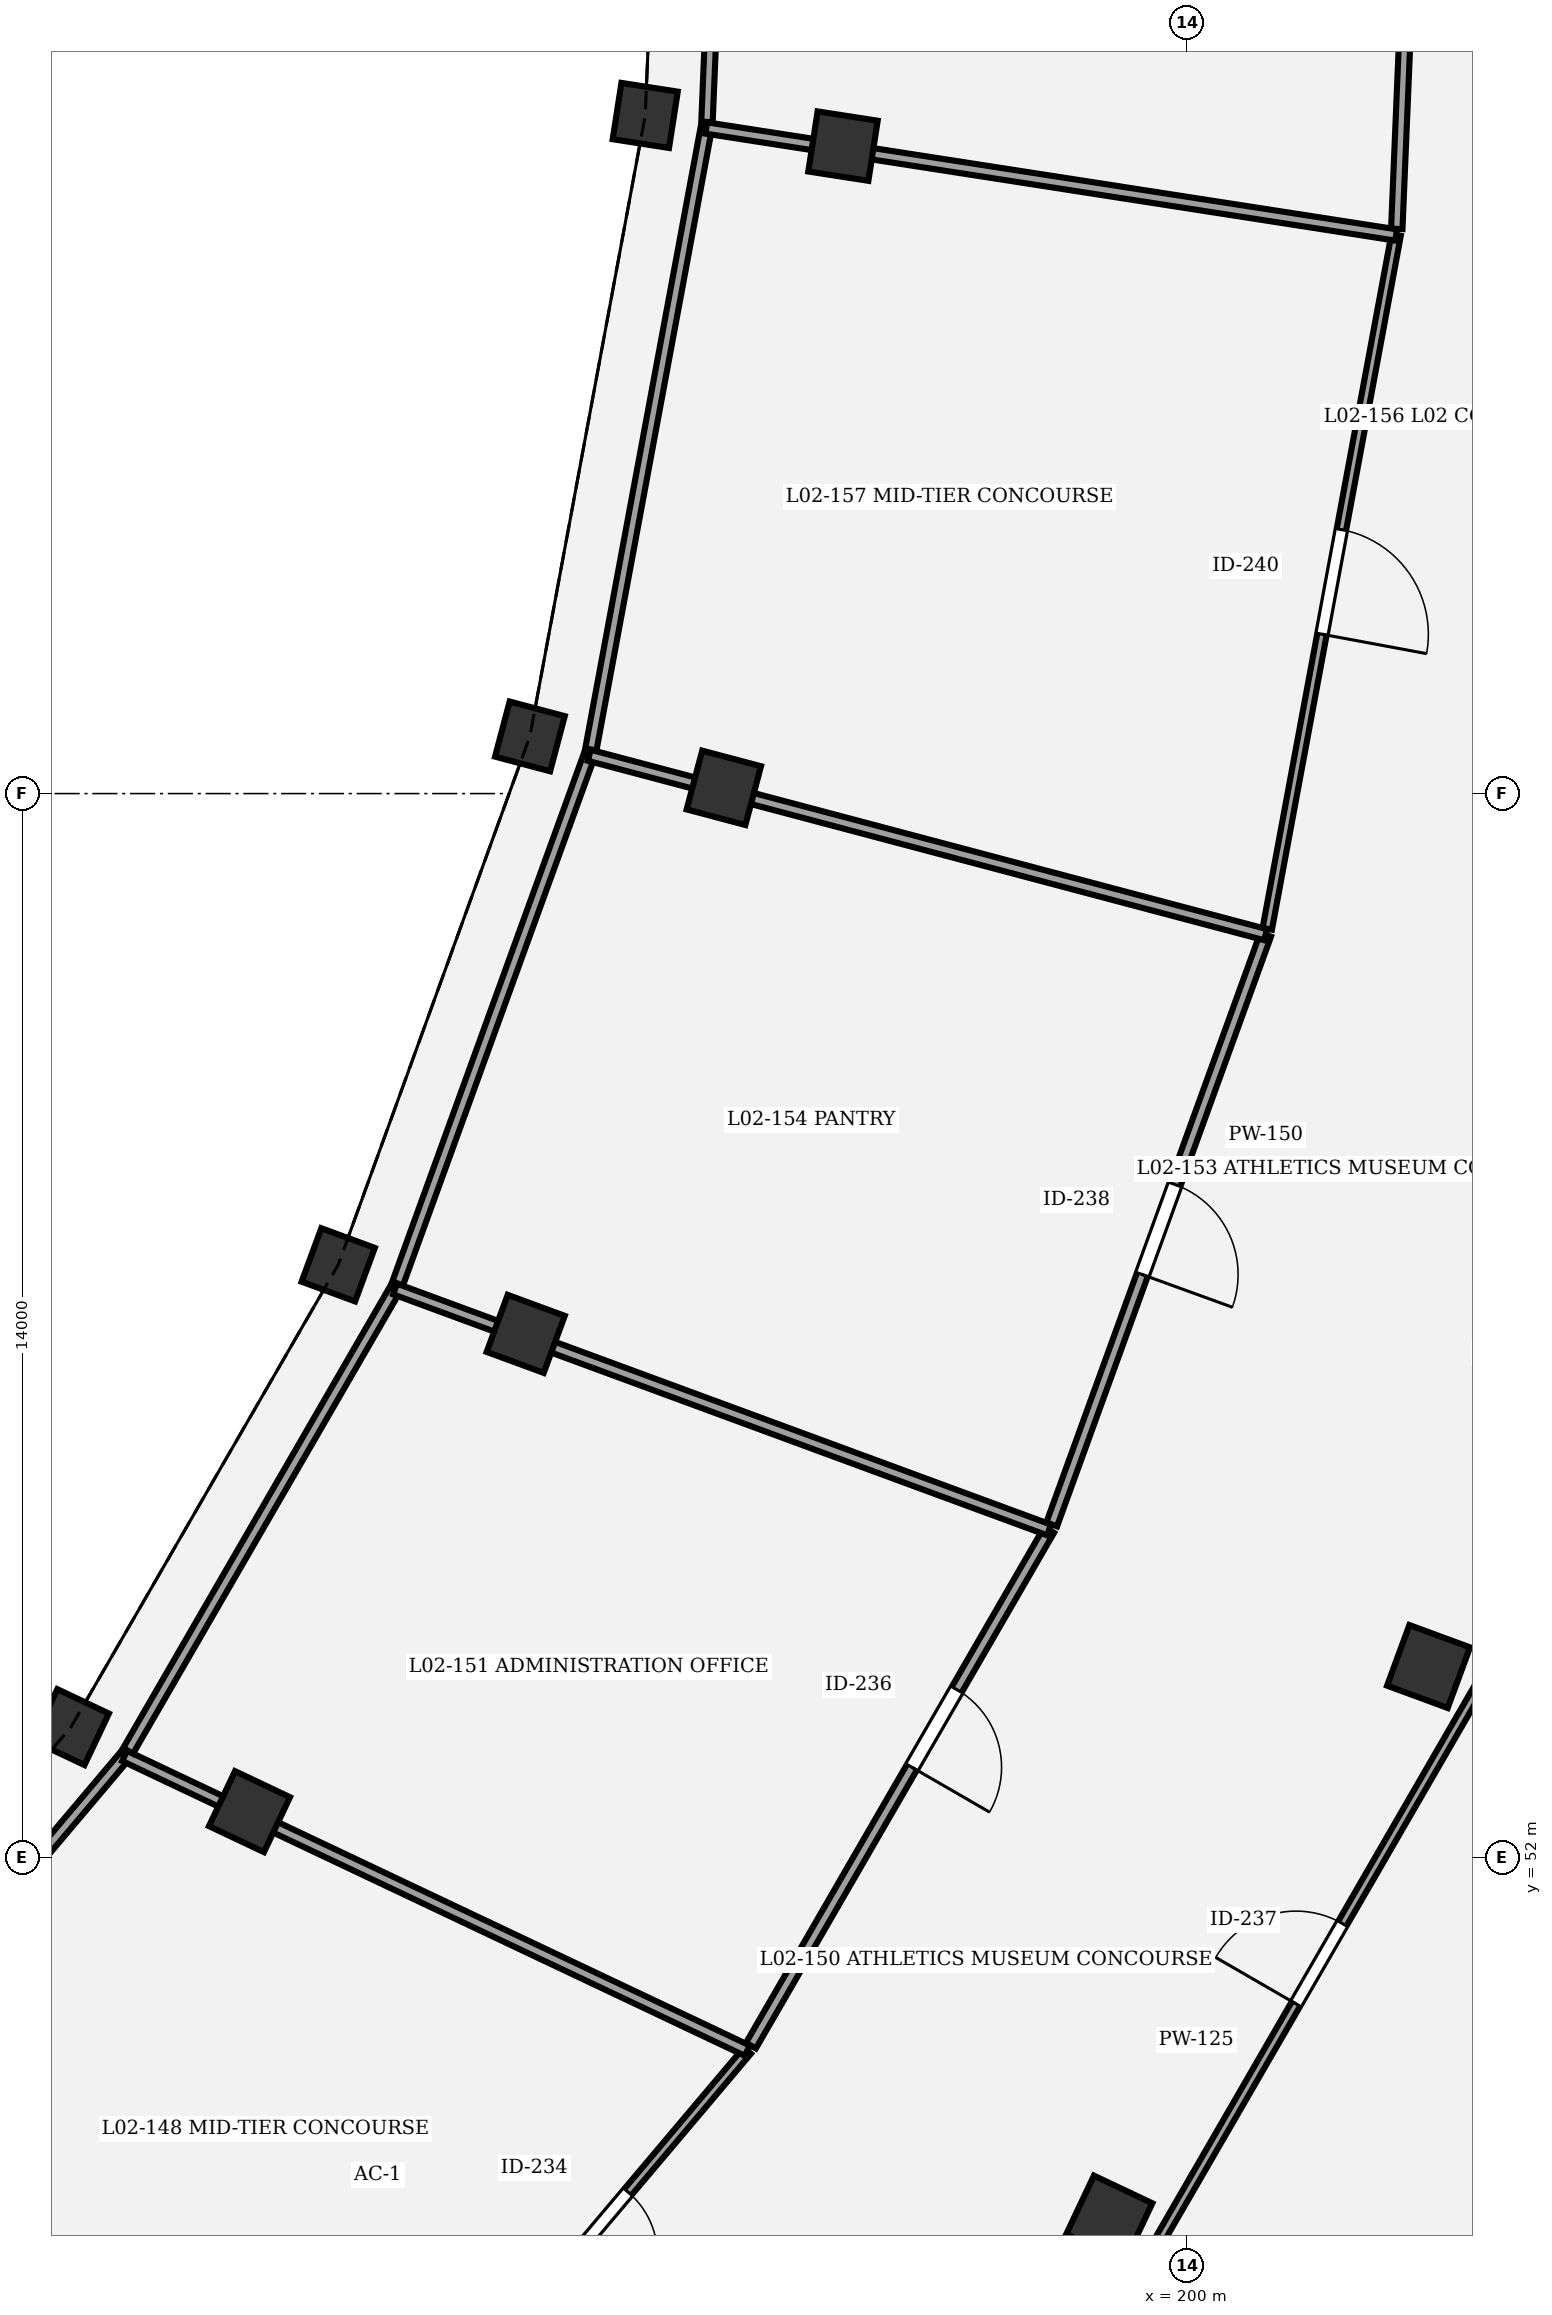
"""IFC4 building model, lengths in metres.
Left out: names, types, materials, properties, quantities, classifications, styles, units other than length and angle.
Written with IfcOpenShell. Run it as: python <this file> out.ifc"""

import sys

from ifc_helpers import new_model, si_unit, direction, frame, frame_2d, origin, origin_2d, place, context, subcontext, project, spatial, rectangle, extrude, element, fill, save


model = new_model("IFC4")
c1 = context("Model", 3, precision=1e-05, world=origin(), true_north=direction((0.0, 1.0)))
c2 = subcontext(c1, "Body", "Model", "MODEL_VIEW")
j1 = project(units=[si_unit("LENGTHUNIT", "METRE"), si_unit("PLANEANGLEUNIT", "RADIAN")], contexts=[c1])
p1 = place(None, origin())
s1 = spatial("IfcSite", under=j1, at=p1, CompositionType="ELEMENT")
p2 = place(p1, origin())
s2 = spatial("IfcBuilding", under=s1, at=p2, CompositionType="ELEMENT")
p3 = place(p2, frame((0.0, 0.0, 10.2)))
s3 = spatial("IfcBuildingStorey", under=s2, at=p3, CompositionType="ELEMENT", Elevation=10.2)
p4 = place(p3, frame((185.313, 53.719, 0.0), z_axis=(0.0, 0.0, 1.0), x_axis=(0.903858661687, -0.4278311813, 0.0)))
e1 = element("IfcColumn", 1, at=p4, inside=s3, PredefinedType="COLUMN", context=c2, shape_type="SweptSolid", body=[
    extrude(rectangle(XDim=0.75, YDim=0.75, at=origin_2d()), origin(), (0.0, 0.0, 1.0), 4.5),
])
p5 = place(p3, frame((187.663, 52.606, 0.0), z_axis=(0.0, 0.0, 1.0), x_axis=(0.903858661687, -0.4278311813, 0.0)))
e2 = element("IfcColumn", 2, at=p5, inside=s3, PredefinedType="COLUMN", context=c2, shape_type="SweptSolid", body=[
    extrude(rectangle(XDim=0.8, YDim=0.8, at=origin_2d()), origin(), (0.0, 0.0, 1.0), 4.5),
])
p6 = place(p3, frame((198.976, 47.252, 0.0), z_axis=(0.0, 0.0, 1.0), x_axis=(0.903858661687, -0.4278311813, 0.0)))
e3 = element("IfcColumn", 3, at=p6, inside=s3, PredefinedType="COLUMN", context=c2, shape_type="SweptSolid", body=[
    extrude(rectangle(XDim=0.85, YDim=0.85, at=origin_2d()), origin(), (0.0, 0.0, 1.0), 4.5),
])
p7 = place(p3, frame((188.83, 59.801, 0.0), z_axis=(0.0, 0.0, 1.0), x_axis=(0.938372433776, -0.34562577382, 0.0)))
e4 = element("IfcColumn", 4, at=p7, inside=s3, PredefinedType="COLUMN", context=c2, shape_type="SweptSolid", body=[
    extrude(rectangle(XDim=0.75, YDim=0.75, at=origin_2d()), origin(), (0.0, 0.0, 1.0), 4.5),
])
p8 = place(p3, frame((191.297, 58.892, 0.0), z_axis=(0.0, 0.0, 1.0), x_axis=(0.938372433776, -0.34562577382, 0.0)))
e5 = element("IfcColumn", 5, at=p8, inside=s3, PredefinedType="COLUMN", context=c2, shape_type="SweptSolid", body=[
    extrude(rectangle(XDim=0.8, YDim=0.8, at=origin_2d()), origin(), (0.0, 0.0, 1.0), 4.5),
])
p9 = place(p3, frame((203.176, 54.516, 0.0), z_axis=(0.0, 0.0, 1.0), x_axis=(0.938372433776, -0.34562577382, 0.0)))
e6 = element("IfcColumn", 6, at=p9, inside=s3, PredefinedType="COLUMN", context=c2, shape_type="SweptSolid", body=[
    extrude(rectangle(XDim=0.85, YDim=0.85, at=origin_2d()), origin(), (0.0, 0.0, 1.0), 4.5),
])
p10 = place(p3, frame((191.352, 66.752, 0.0), z_axis=(0.0, 0.0, 1.0), x_axis=(0.966600102017, -0.256289373133, 0.0)))
e7 = element("IfcColumn", 7, at=p10, inside=s3, PredefinedType="COLUMN", context=c2, shape_type="SweptSolid", body=[
    extrude(rectangle(XDim=0.75, YDim=0.75, at=origin_2d()), origin(), (0.0, 0.0, 1.0), 4.5),
])
p11 = place(p3, frame((193.903, 66.076, 0.0), z_axis=(0.0, 0.0, 1.0), x_axis=(0.966600102017, -0.256289373133, 0.0)))
e8 = element("IfcColumn", 8, at=p11, inside=s3, PredefinedType="COLUMN", context=c2, shape_type="SweptSolid", body=[
    extrude(rectangle(XDim=0.8, YDim=0.8, at=origin_2d()), origin(), (0.0, 0.0, 1.0), 4.5),
])
p12 = place(p3, frame((192.869, 74.922, 0.0), z_axis=(0.0, 0.0, 1.0), x_axis=(0.98817491911, -0.153330783737, 0.0)))
e9 = element("IfcColumn", 9, at=p12, inside=s3, PredefinedType="COLUMN", context=c2, shape_type="SweptSolid", body=[
    extrude(rectangle(XDim=0.75, YDim=0.75, at=origin_2d()), origin(), (0.0, 0.0, 1.0), 4.5),
])
p13 = place(p3, frame((195.471, 74.518, 0.0), z_axis=(0.0, 0.0, 1.0), x_axis=(0.98817491911, -0.153330783737, 0.0)))
e10 = element("IfcColumn", 10, at=p13, inside=s3, PredefinedType="COLUMN", context=c2, shape_type="SweptSolid", body=[
    extrude(rectangle(XDim=0.8, YDim=0.8, at=origin_2d()), origin(), (0.0, 0.0, 1.0), 4.5),
])
p14 = place(p3, frame((194.212, 49.462, 0.0), z_axis=(0.0, 0.0, 1.0), x_axis=(-0.645180817826, -0.764029915847, 0.0)))
e11 = element("IfcWall", 11, at=p14, inside=s3, PredefinedType="PARTITIONING", context=c2, shape_type="SweptSolid", body=[
    extrude(rectangle(XDim=7.779, YDim=0.125, at=frame_2d((3.89, 0.0))), origin(), (0.0, 0.0, 1.0), 3.25),
])
p15 = place(p14, frame((2.434, 0.0, 0.0)))
e12 = element("IfcOpeningElement", 12, at=p15, cuts=e11, PredefinedType="OPENING", context=c2, shape_type="SweptSolid", body=[
    extrude(rectangle(XDim=1.1, YDim=2.2, at=frame_2d((0.55, 1.1))), frame((0.0, 0.073, 0.0), z_axis=(0.0, -1.0, 0.0), x_axis=(1.0, 0.0, 0.0)), (0.0, 0.0, 1.0), 0.145),
])
p16 = place(p3, frame((198.183, 56.312, 0.0), z_axis=(0.0, 0.0, 1.0), x_axis=(-0.500584301803, -0.865687794063, 0.0)))
e13 = element("IfcWall", 13, at=p16, inside=s3, PredefinedType="PARTITIONING", context=c2, shape_type="SweptSolid", body=[
    extrude(rectangle(XDim=7.837, YDim=0.15, at=frame_2d((3.918, 0.0))), origin(), (0.0, 0.0, 1.0), 3.25),
])
p17 = place(p16, frame((2.426, 0.0, 0.0)))
e14 = element("IfcOpeningElement", 14, at=p17, cuts=e13, PredefinedType="OPENING", context=c2, shape_type="SweptSolid", body=[
    extrude(rectangle(XDim=1.18, YDim=2.2, at=frame_2d((0.59, 1.1))), frame((0.0, 0.085, 0.0), z_axis=(0.0, -1.0, 0.0), x_axis=(1.0, 0.0, 0.0)), (0.0, 0.0, 1.0), 0.17),
])
p18 = place(p3, frame((199.641, 46.981, 0.0), z_axis=(0.0, 0.0, 1.0), x_axis=(0.500559280672, 0.865702262059, 0.0)))
e15 = element("IfcWall", 15, at=p18, inside=s3, PredefinedType="PARTITIONING", context=c2, shape_type="SweptSolid", body=[
    extrude(rectangle(XDim=8.375, YDim=0.125, at=frame_2d((4.187, 0.0))), origin(), (0.0, 0.0, 1.0), 3.25),
])
p19 = place(p18, frame((3.577, 0.0, 0.0)))
e16 = element("IfcOpeningElement", 16, at=p19, cuts=e15, PredefinedType="OPENING", context=c2, shape_type="SweptSolid", body=[
    extrude(rectangle(XDim=1.22, YDim=2.2, at=frame_2d((0.61, 1.1))), frame((0.0, 0.073, 0.0), z_axis=(0.0, -1.0, 0.0), x_axis=(1.0, 0.0, 0.0)), (0.0, 0.0, 1.0), 0.145),
])
p20 = place(p3, frame((201.032, 64.144, 0.0), z_axis=(0.0, 0.0, 1.0), x_axis=(-0.341044733968, -0.940047067669, 0.0)))
e17 = element("IfcWall", 17, at=p20, inside=s3, PredefinedType="PARTITIONING", context=c2, shape_type="SweptSolid", body=[
    extrude(rectangle(XDim=8.254, YDim=0.15, at=frame_2d((4.127, 0.0))), origin(), (0.0, 0.0, 1.0), 3.25),
])
p21 = place(p20, frame((3.497, 0.0, 0.0)))
e18 = element("IfcOpeningElement", 18, at=p21, cuts=e17, PredefinedType="OPENING", context=c2, shape_type="SweptSolid", body=[
    extrude(rectangle(XDim=1.26, YDim=2.2, at=frame_2d((0.63, 1.1))), frame((0.0, 0.085, 0.0), z_axis=(0.0, -1.0, 0.0), x_axis=(1.0, 0.0, 0.0)), (0.0, 0.0, 1.0), 0.17),
])
p22 = place(p3, frame((202.749, 73.349, 0.0), z_axis=(0.0, 0.0, 1.0), x_axis=(-0.182600545941, -0.983187184936, 0.0)))
e19 = element("IfcWall", 19, at=p22, inside=s3, PredefinedType="PARTITIONING", context=c2, shape_type="SweptSolid", body=[
    extrude(rectangle(XDim=9.284, YDim=0.125, at=frame_2d((4.642, 0.0))), origin(), (0.0, 0.0, 1.0), 3.25),
])
p23 = place(p22, frame((3.942, 0.0, 0.0)))
e20 = element("IfcOpeningElement", 20, at=p23, cuts=e19, PredefinedType="OPENING", context=c2, shape_type="SweptSolid", body=[
    extrude(rectangle(XDim=1.4, YDim=2.2, at=frame_2d((0.7, 1.1))), frame((0.0, 0.073, 0.0), z_axis=(0.0, -1.0, 0.0), x_axis=(1.0, 0.0, 0.0)), (0.0, 0.0, 1.0), 0.145),
])
p24 = place(p3, frame((203.325, 86.96, 0.0), z_axis=(0.0, 0.0, 1.0), x_axis=(-0.041894479342, -0.999122040894, 0.0)))
e21 = element("IfcWall", 21, at=p24, inside=s3, PredefinedType="PARTITIONING", context=c2, shape_type="SweptSolid", body=[
    extrude(rectangle(XDim=13.543, YDim=0.15, at=frame_2d((6.771, 0.0))), origin(), (0.0, 0.0, 1.0), 3.25),
])
p25 = place(p24, frame((6.322, 0.0, 0.0)))
e22 = element("IfcOpeningElement", 22, at=p25, cuts=e21, PredefinedType="OPENING", context=c2, shape_type="SweptSolid", body=[
    extrude(rectangle(XDim=0.9, YDim=2.3, at=frame_2d((0.45, 1.15))), frame((0.0, 0.085, 0.0), z_axis=(0.0, -1.0, 0.0), x_axis=(1.0, 0.0, 0.0)), (0.0, 0.0, 1.0), 0.17),
])
p26 = place(p3, frame((181.525, 48.017, 0.0), z_axis=(0.0, 0.0, 1.0), x_axis=(0.64516899819, 0.764039896716, 0.0)))
e23 = element("IfcWall", 23, at=p26, inside=s3, PredefinedType="PARTITIONING", context=c2, shape_type="SweptSolid", body=[
    extrude(rectangle(XDim=6.967, YDim=0.15, at=frame_2d((3.483, 0.0))), origin(), (0.0, 0.0, 1.0), 3.25),
])
p27 = place(p3, frame((186.02, 53.34, 0.0), z_axis=(0.0, 0.0, 1.0), x_axis=(0.903857372861, -0.427833904132, 0.0)))
e24 = element("IfcWall", 24, at=p27, inside=s3, PredefinedType="PARTITIONING", context=c2, shape_type="SweptSolid", body=[
    extrude(rectangle(XDim=9.063, YDim=0.15, at=frame_2d((4.532, 0.0))), origin(), (0.0, 0.0, 1.0), 3.25),
])
p28 = place(p3, frame((186.066, 53.406, 0.0), z_axis=(0.0, 0.0, 1.0), x_axis=(0.500549390525, 0.865707980583, 0.0)))
e25 = element("IfcWall", 25, at=p28, inside=s3, PredefinedType="PARTITIONING", context=c2, shape_type="SweptSolid", body=[
    extrude(rectangle(XDim=7.018, YDim=0.15, at=frame_2d((3.509, 0.0))), origin(), (0.0, 0.0, 1.0), 3.25),
])
p29 = place(p3, frame((189.579, 59.482, 0.0), z_axis=(0.0, 0.0, 1.0), x_axis=(0.938348571445, -0.345690553049, 0.0)))
e26 = element("IfcWall", 26, at=p29, inside=s3, PredefinedType="PARTITIONING", context=c2, shape_type="SweptSolid", body=[
    extrude(rectangle(XDim=9.17, YDim=0.15, at=frame_2d((4.585, 0.0))), origin(), (0.0, 0.0, 1.0), 3.25),
])
p30 = place(p3, frame((189.612, 59.555, 0.0), z_axis=(0.0, 0.0, 1.0), x_axis=(0.34104817416, 0.940045819576, 0.0)))
e27 = element("IfcWall", 27, at=p30, inside=s3, PredefinedType="PARTITIONING", context=c2, shape_type="SweptSolid", body=[
    extrude(rectangle(XDim=7.392, YDim=0.15, at=frame_2d((3.696, 0.0))), origin(), (0.0, 0.0, 1.0), 3.25),
])
p31 = place(p3, frame((192.133, 66.504, 0.0), z_axis=(0.0, 0.0, 1.0), x_axis=(0.96658744027, -0.256337122383, 0.0)))
e28 = element("IfcWall", 28, at=p31, inside=s3, PredefinedType="PARTITIONING", context=c2, shape_type="SweptSolid", body=[
    extrude(rectangle(XDim=9.207, YDim=0.15, at=frame_2d((4.604, 0.0))), origin(), (0.0, 0.0, 1.0), 3.25),
])
p32 = place(p3, frame((192.154, 66.581, 0.0), z_axis=(0.0, 0.0, 1.0), x_axis=(0.182614898171, 0.983184519287, 0.0)))
e29 = element("IfcWall", 29, at=p32, inside=s3, PredefinedType="PARTITIONING", context=c2, shape_type="SweptSolid", body=[
    extrude(rectangle(XDim=8.316, YDim=0.15, at=frame_2d((4.158, 0.0))), origin(), (0.0, 0.0, 1.0), 3.25),
])
p33 = place(p3, frame((193.673, 74.757, 0.0), z_axis=(0.0, 0.0, 1.0), x_axis=(0.988184734008, -0.15326751604, 0.0)))
e30 = element("IfcWall", 30, at=p33, inside=s3, PredefinedType="PARTITIONING", context=c2, shape_type="SweptSolid", body=[
    extrude(rectangle(XDim=9.185, YDim=0.15, at=frame_2d((4.592, 0.0))), origin(), (0.0, 0.0, 1.0), 3.25),
])
p34 = place(p3, frame((193.682, 74.836, 0.0), z_axis=(0.0, 0.0, 1.0), x_axis=(0.041909219346, 0.999121422718, 0.0)))
e31 = element("IfcWall", 31, at=p34, inside=s3, PredefinedType="PARTITIONING", context=c2, shape_type="SweptSolid", body=[
    extrude(rectangle(XDim=12.135, YDim=0.15, at=frame_2d((6.067, 0.0))), origin(), (0.0, 0.0, 1.0), 3.25),
])
p35 = place(p15, origin())
e32 = element("IfcDoor", 32, at=p35, inside=s3, OperationType="SINGLE_SWING_RIGHT", PredefinedType="DOOR", context=c2, shape_type="SweptSolid", body=[
    extrude(rectangle(XDim=1.1, YDim=2.2, at=frame_2d((0.55, 1.1))), frame((0.0, 0.025, 0.0), z_axis=(0.0, -1.0, 0.0), x_axis=(1.0, 0.0, 0.0)), (0.0, 0.0, 1.0), 0.05),
])
fill(e12, e32)
p36 = place(p17, origin())
e33 = element("IfcDoor", 33, at=p36, inside=s3, OperationType="SINGLE_SWING_RIGHT", PredefinedType="DOOR", context=c2, shape_type="SweptSolid", body=[
    extrude(rectangle(XDim=1.18, YDim=2.2, at=frame_2d((0.59, 1.1))), frame((0.0, 0.025, 0.0), z_axis=(0.0, -1.0, 0.0), x_axis=(1.0, 0.0, 0.0)), (0.0, 0.0, 1.0), 0.05),
])
fill(e14, e33)
p37 = place(p19, origin())
e34 = element("IfcDoor", 34, at=p37, inside=s3, OperationType="SINGLE_SWING_LEFT", PredefinedType="DOOR", context=c2, shape_type="SweptSolid", body=[
    extrude(rectangle(XDim=1.22, YDim=2.2, at=frame_2d((0.61, 1.1))), frame((0.0, 0.025, 0.0), z_axis=(0.0, -1.0, 0.0), x_axis=(1.0, 0.0, 0.0)), (0.0, 0.0, 1.0), 0.05),
])
fill(e16, e34)
p38 = place(p21, origin())
e35 = element("IfcDoor", 35, at=p38, inside=s3, OperationType="SINGLE_SWING_RIGHT", PredefinedType="DOOR", context=c2, shape_type="SweptSolid", body=[
    extrude(rectangle(XDim=1.26, YDim=2.2, at=frame_2d((0.63, 1.1))), frame((0.0, 0.025, 0.0), z_axis=(0.0, -1.0, 0.0), x_axis=(1.0, 0.0, 0.0)), (0.0, 0.0, 1.0), 0.05),
])
fill(e18, e35)
p39 = place(p23, origin())
e36 = element("IfcDoor", 36, at=p39, inside=s3, OperationType="SINGLE_SWING_RIGHT", PredefinedType="DOOR", context=c2, shape_type="SweptSolid", body=[
    extrude(rectangle(XDim=1.4, YDim=2.2, at=frame_2d((0.7, 1.1))), frame((0.0, 0.025, 0.0), z_axis=(0.0, -1.0, 0.0), x_axis=(1.0, 0.0, 0.0)), (0.0, 0.0, 1.0), 0.05),
])
fill(e20, e36)
save(model, sys.argv[1])
